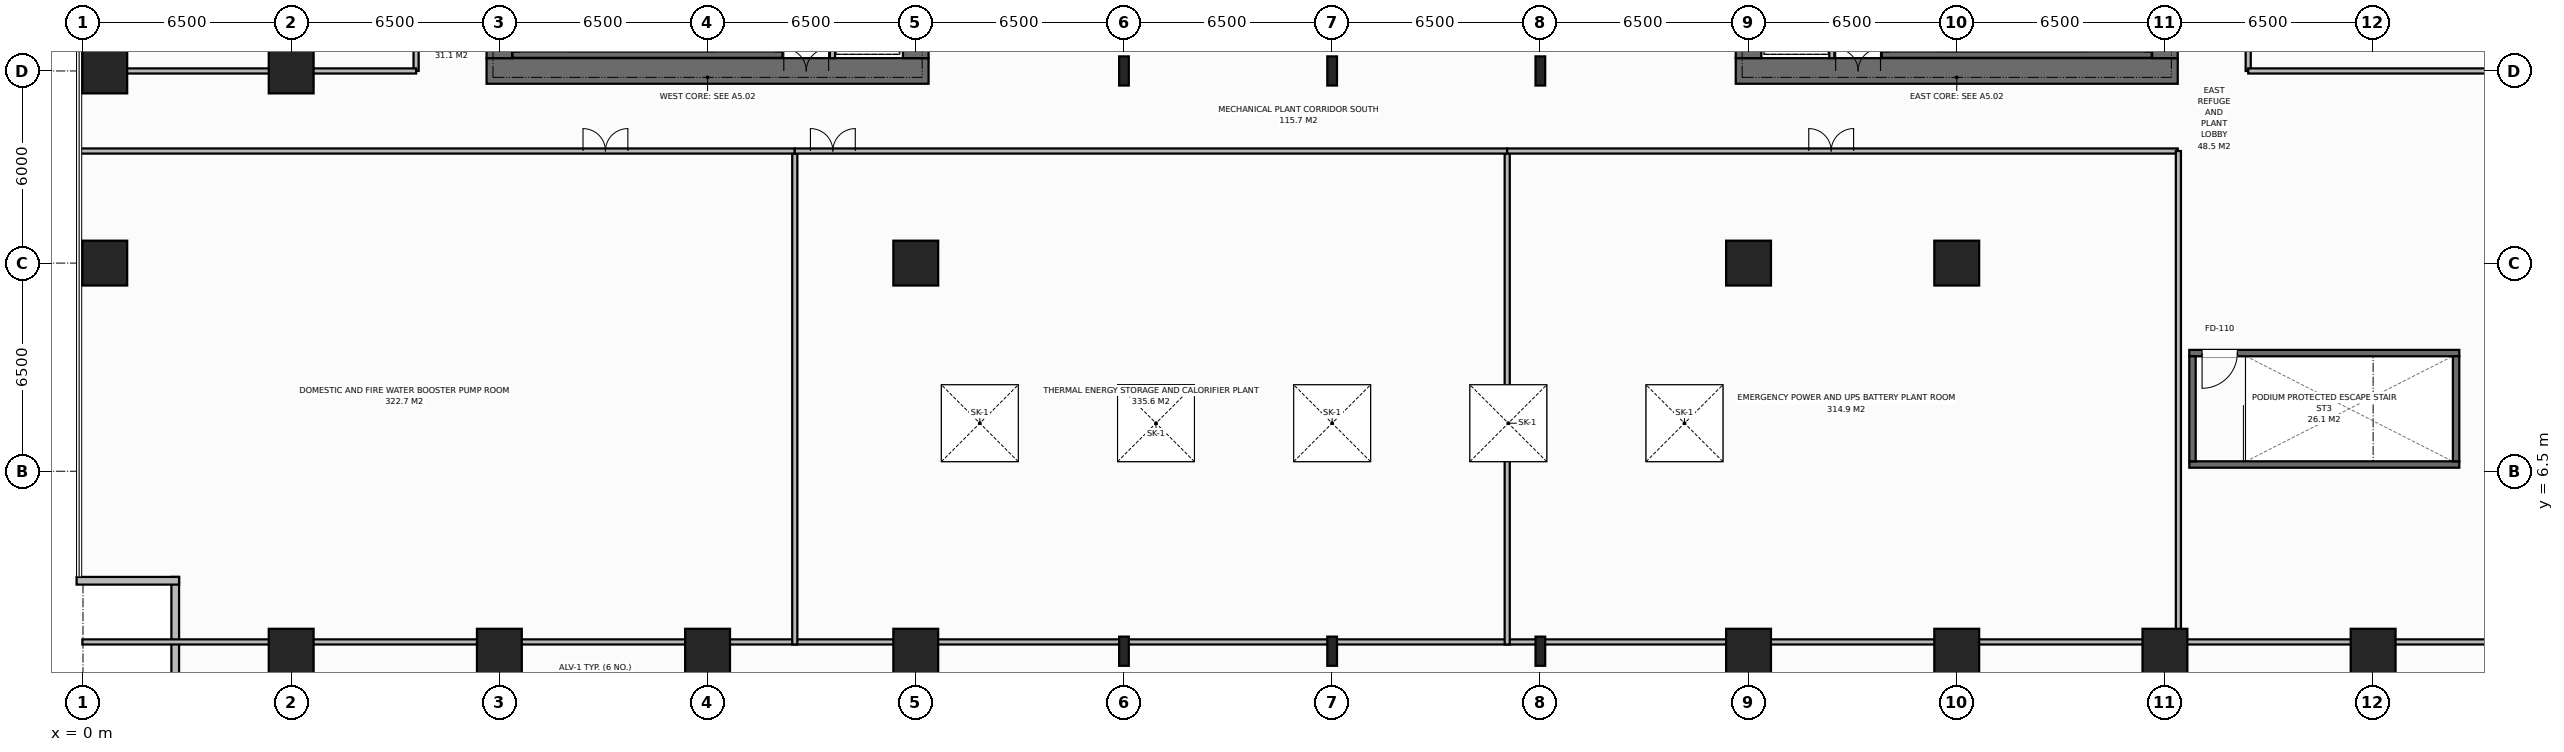
"""IFC4 building model, lengths in metres.
Left out: names, types, materials, properties, quantities, classifications, styles, units other than length and angle.
Written with IfcOpenShell. Run it as: python <this file> out.ifc"""

import sys

from ifc_helpers import new_model, si_unit, direction, frame, frame_2d, origin, origin_2d, place, context, subcontext, project, spatial, rectangle, i_section, extrude, element, fill, save


model = new_model("IFC4")
c1 = context("Model", 3, precision=1e-05, world=origin(), true_north=direction((0.0, 1.0)))
c2 = subcontext(c1, "Body", "Model", "MODEL_VIEW")
j1 = project(units=[si_unit("LENGTHUNIT", "METRE"), si_unit("PLANEANGLEUNIT", "RADIAN")], contexts=[c1])
p1 = place(None, origin())
s1 = spatial("IfcSite", under=j1, at=p1, CompositionType="ELEMENT")
p2 = place(p1, origin())
s2 = spatial("IfcBuilding", under=s1, at=p2, CompositionType="ELEMENT")
p3 = place(p2, frame((0.0, 0.0, 22.0)))
s3 = spatial("IfcBuildingStorey", under=s2, at=p3, CompositionType="ELEMENT", Elevation=22.0)
p4 = place(p3, frame((12.6, 19.0, 0.0), z_axis=(0.0, 0.0, 1.0), x_axis=(1.0, 0.0, 0.0)))
e1 = element("IfcWall", 1, at=p4, inside=s3, PredefinedType="SHEAR", context=c2, shape_type="SweptSolid", body=[
    extrude(rectangle(XDim=13.8, YDim=0.8, at=frame_2d((6.9, 0.0))), origin(), (0.0, 0.0, 1.0), 5.8),
])
p5 = place(p4, frame((9.28, 0.0, 0.0)))
e2 = element("IfcOpeningElement", 2, at=p5, cuts=e1, PredefinedType="OPENING", context=c2, shape_type="SweptSolid", body=[
    extrude(rectangle(XDim=1.4, YDim=2.2, at=frame_2d((0.7, 1.1))), frame((0.0, 0.41, 0.0), z_axis=(0.0, -1.0, 0.0), x_axis=(1.0, 0.0, 0.0)), (0.0, 0.0, 1.0), 0.82),
])
p6 = place(p3, frame((13.0, 19.4, 0.0), z_axis=(0.0, 0.0, 1.0), x_axis=(0.0, 1.0, 0.0)))
e3 = element("IfcWall", 3, at=p6, inside=s3, PredefinedType="SHEAR", context=c2, shape_type="SweptSolid", body=[
    extrude(rectangle(XDim=13.2, YDim=0.8, at=frame_2d((6.6, 0.0))), origin(), (0.0, 0.0, 1.0), 5.8),
])
p7 = place(p6, frame((4.65, 0.0, 0.0)))
e4 = element("IfcOpeningElement", 4, at=p7, cuts=e3, PredefinedType="OPENING", context=c2, shape_type="SweptSolid", body=[
    extrude(rectangle(XDim=1.4, YDim=2.2, at=frame_2d((0.7, 1.1))), frame((0.0, 0.41, 0.0), z_axis=(0.0, -1.0, 0.0), x_axis=(1.0, 0.0, 0.0)), (0.0, 0.0, 1.0), 0.82),
])
p8 = place(p3, frame((26.0, 19.4, 0.0), z_axis=(0.0, 0.0, 1.0), x_axis=(0.0, 1.0, 0.0)))
e5 = element("IfcWall", 5, at=p8, inside=s3, PredefinedType="SHEAR", context=c2, shape_type="SweptSolid", body=[
    extrude(rectangle(XDim=13.2, YDim=0.8, at=frame_2d((6.6, 0.0))), origin(), (0.0, 0.0, 1.0), 5.8),
])
p9 = place(p3, frame((51.6, 19.0, 0.0), z_axis=(0.0, 0.0, 1.0), x_axis=(1.0, 0.0, 0.0)))
e6 = element("IfcWall", 6, at=p9, inside=s3, PredefinedType="SHEAR", context=c2, shape_type="SweptSolid", body=[
    extrude(rectangle(XDim=13.8, YDim=0.8, at=frame_2d((6.9, 0.0))), origin(), (0.0, 0.0, 1.0), 5.8),
])
p10 = place(p9, frame((3.12, 0.0, 0.0)))
e7 = element("IfcOpeningElement", 7, at=p10, cuts=e6, PredefinedType="OPENING", context=c2, shape_type="SweptSolid", body=[
    extrude(rectangle(XDim=1.4, YDim=2.2, at=frame_2d((0.7, 1.1))), frame((0.0, 0.41, 0.0), z_axis=(0.0, -1.0, 0.0), x_axis=(1.0, 0.0, 0.0)), (0.0, 0.0, 1.0), 0.82),
])
p11 = place(p3, frame((52.0, 19.4, 0.0), z_axis=(0.0, 0.0, 1.0), x_axis=(0.0, 1.0, 0.0)))
e8 = element("IfcWall", 8, at=p11, inside=s3, PredefinedType="SHEAR", context=c2, shape_type="SweptSolid", body=[
    extrude(rectangle(XDim=13.2, YDim=0.8, at=frame_2d((6.6, 0.0))), origin(), (0.0, 0.0, 1.0), 5.8),
])
p12 = place(p3, frame((65.0, 19.4, 0.0), z_axis=(0.0, 0.0, 1.0), x_axis=(0.0, 1.0, 0.0)))
e9 = element("IfcWall", 9, at=p12, inside=s3, PredefinedType="SHEAR", context=c2, shape_type="SweptSolid", body=[
    extrude(rectangle(XDim=13.2, YDim=0.8, at=frame_2d((6.6, 0.0))), origin(), (0.0, 0.0, 1.0), 5.8),
])
p13 = place(p12, frame((8.05, 0.0, 0.0)))
e10 = element("IfcOpeningElement", 10, at=p13, cuts=e9, PredefinedType="OPENING", context=c2, shape_type="SweptSolid", body=[
    extrude(rectangle(XDim=1.3, YDim=2.2, at=frame_2d((0.65, 1.1))), frame((0.0, 0.41, 0.0), z_axis=(0.0, -1.0, 0.0), x_axis=(1.0, 0.0, 0.0)), (0.0, 0.0, 1.0), 0.82),
])
for number, where, z_axis, x_axis in (
    (11, (13.41, 19.51, 0.0), (0.0, 0.0, 1.0), (1.0, 0.0, 0.0)),
    (12, (56.16, 19.51, 0.0), (0.0, 0.0, 1.0), (1.0, 0.0, 0.0)),
):
    element("IfcWall", number, at=place(p3, frame(where, z_axis=z_axis, x_axis=x_axis)), inside=s3, PredefinedType="SHEAR", context=c2, shape_type="SweptSolid", body=[
        extrude(rectangle(XDim=8.43, YDim=0.2, at=frame_2d((4.215, 0.0))), origin(), (0.0, 0.0, 1.0), 5.8),
    ])
p14 = place(p3, frame((65.76, 6.71, 0.0), z_axis=(0.0, 0.0, 1.0), x_axis=(1.0, 0.0, 0.0)))
e13 = element("IfcWall", 13, at=p14, inside=s3, PredefinedType="SHEAR", context=c2, shape_type="SweptSolid", body=[
    extrude(rectangle(XDim=8.43, YDim=0.2, at=frame_2d((4.215, 0.0))), origin(), (0.0, 0.0, 1.0), 5.55),
])
p15 = place(p3, frame((65.76, 10.19, 0.0), z_axis=(0.0, 0.0, 1.0), x_axis=(1.0, 0.0, 0.0)))
e14 = element("IfcWall", 14, at=p15, inside=s3, PredefinedType="SHEAR", context=c2, shape_type="SweptSolid", body=[
    extrude(rectangle(XDim=8.43, YDim=0.2, at=frame_2d((4.215, 0.0))), origin(), (0.0, 0.0, 1.0), 5.55),
])
p16 = place(p15, frame((0.4, 0.0, 0.0)))
e15 = element("IfcOpeningElement", 15, at=p16, cuts=e14, PredefinedType="OPENING", context=c2, shape_type="SweptSolid", body=[
    extrude(rectangle(XDim=1.1, YDim=2.15, at=frame_2d((0.55, 1.075))), frame((0.0, 0.11, 0.0), z_axis=(0.0, -1.0, 0.0), x_axis=(1.0, 0.0, 0.0)), (0.0, 0.0, 1.0), 0.22),
])
for number, where, z_axis, x_axis in (
    (16, (65.86, 6.81, 0.0), (0.0, 0.0, 1.0), (0.0, 1.0, 0.0)),
    (17, (74.09, 6.81, 0.0), (0.0, 0.0, 1.0), (0.0, 1.0, 0.0)),
):
    element("IfcWall", number, at=place(p3, frame(where, z_axis=z_axis, x_axis=x_axis)), inside=s3, PredefinedType="SHEAR", context=c2, shape_type="SweptSolid", body=[
        extrude(rectangle(XDim=3.28, YDim=0.2, at=frame_2d((1.64, 0.0))), origin(), (0.0, 0.0, 1.0), 5.55),
    ])
for number, where, z_axis, x_axis in (
    (18, (58.5, 13.0, 0.0), (0.0, 0.0, 1.0), (1.0, 0.0, 0.0)),
    (19, (6.5, 19.0, 0.0), (0.0, 0.0, 1.0), (1.0, 0.0, 0.0)),
    (20, (26.0, 13.0, 0.0), (0.0, 0.0, 1.0), (1.0, 0.0, 0.0)),
    (21, (52.0, 13.0, 0.0), (0.0, 0.0, 1.0), (1.0, 0.0, 0.0)),
    (22, (6.5, 0.88, 0.0), (0.0, 0.0, 1.0), (1.0, 0.0, 0.0)),
    (23, (13.0, 0.88, 0.0), (0.0, 0.0, 1.0), (1.0, 0.0, 0.0)),
    (24, (19.5, 0.88, 0.0), (0.0, 0.0, 1.0), (1.0, 0.0, 0.0)),
    (25, (26.0, 0.88, 0.0), (0.0, 0.0, 1.0), (1.0, 0.0, 0.0)),
    (26, (52.0, 0.88, 0.0), (0.0, 0.0, 1.0), (1.0, 0.0, 0.0)),
    (27, (58.5, 0.88, 0.0), (0.0, 0.0, 1.0), (1.0, 0.0, 0.0)),
    (28, (65.0, 0.88, 0.0), (0.0, 0.0, 1.0), (1.0, 0.0, 0.0)),
    (29, (71.5, 0.88, 0.0), (0.0, 0.0, 1.0), (1.0, 0.0, 0.0)),
    (30, (0.68, 13.0, 0.0), (0.0, 0.0, 1.0), (1.0, 0.0, 0.0)),
    (31, (0.68, 19.0, 0.0), (0.0, 0.0, 1.0), (1.0, 0.0, 0.0)),
):
    element("IfcColumn", number, at=place(p3, frame(where, z_axis=z_axis, x_axis=x_axis)), inside=s3, PredefinedType="COLUMN", context=c2, shape_type="SweptSolid", body=[
        extrude(rectangle(XDim=1.4, YDim=1.4, at=origin_2d()), origin(), (0.0, 0.0, 1.0), 5.8),
    ])
for number, where, z_axis, x_axis in (
    (32, (32.5, 0.88, 0.0), (0.0, 0.0, 1.0), (1.0, 0.0, 0.0)),
    (33, (39.0, 0.88, 0.0), (0.0, 0.0, 1.0), (1.0, 0.0, 0.0)),
    (34, (45.5, 0.88, 0.0), (0.0, 0.0, 1.0), (1.0, 0.0, 0.0)),
    (35, (32.5, 19.0, 0.0), (0.0, 0.0, 1.0), (1.0, 0.0, 0.0)),
    (36, (39.0, 19.0, 0.0), (0.0, 0.0, 1.0), (1.0, 0.0, 0.0)),
    (37, (45.5, 19.0, 0.0), (0.0, 0.0, 1.0), (1.0, 0.0, 0.0)),
):
    element("IfcColumn", number, at=place(p3, frame(where, z_axis=z_axis, x_axis=x_axis)), inside=s3, PredefinedType="COLUMN", context=c2, shape_type="SweptSolid", body=[
        extrude(i_section(OverallWidth=0.302, OverallDepth=0.91, WebThickness=0.021, FlangeThickness=0.04, at=origin_2d()), origin(), (0.0, 0.0, 1.0), 5.8),
    ])
for number, where, z_axis, x_axis in (
    (38, (2.88, 0.0, 0.0), (0.0, 0.0, 1.0), (0.0, 1.0, 0.0)),
    (39, (3.0, 3.08, 0.0), (0.0, 0.0, 1.0), (-1.0, 0.0, 0.0)),
):
    element("IfcWall", number, at=place(p3, frame(where, z_axis=z_axis, x_axis=x_axis)), inside=s3, PredefinedType="STANDARD", context=c2, shape_type="SweptSolid", body=[
        extrude(rectangle(XDim=3.2, YDim=0.24, at=frame_2d((1.6, 0.0))), origin(), (0.0, 0.0, 1.0), 5.55),
    ])
p17 = place(p3, frame((23.4, 19.4, 0.0), z_axis=(0.0, 0.0, 1.0), x_axis=(0.0, 1.0, 0.0)))
e40 = element("IfcWall", 40, at=p17, inside=s3, PredefinedType="STANDARD", context=c2, shape_type="SweptSolid", body=[
    extrude(rectangle(XDim=13.2, YDim=0.16, at=frame_2d((6.6, 0.0))), origin(), (0.0, 0.0, 1.0), 5.55),
])
p18 = place(p17, frame((0.55, 0.0, 0.0)))
e41 = element("IfcOpeningElement", 41, at=p18, cuts=e40, PredefinedType="OPENING", context=c2, shape_type="SweptSolid", body=[
    extrude(rectangle(XDim=1.1, YDim=2.2, at=frame_2d((0.55, 1.1))), frame((0.0, 0.09, 0.0), z_axis=(0.0, -1.0, 0.0), x_axis=(1.0, 0.0, 0.0)), (0.0, 0.0, 1.0), 0.18),
])
p19 = place(p17, frame((2.7, 0.0, 0.0)))
e42 = element("IfcOpeningElement", 42, at=p19, cuts=e40, PredefinedType="OPENING", context=c2, shape_type="SweptSolid", body=[
    extrude(rectangle(XDim=1.1, YDim=2.2, at=frame_2d((0.55, 1.1))), frame((0.0, 0.09, 0.0), z_axis=(0.0, -1.0, 0.0), x_axis=(1.0, 0.0, 0.0)), (0.0, 0.0, 1.0), 0.18),
])
p20 = place(p3, frame((54.6, 19.4, 0.0), z_axis=(0.0, 0.0, 1.0), x_axis=(0.0, 1.0, 0.0)))
e43 = element("IfcWall", 43, at=p20, inside=s3, PredefinedType="STANDARD", context=c2, shape_type="SweptSolid", body=[
    extrude(rectangle(XDim=13.2, YDim=0.16, at=frame_2d((6.6, 0.0))), origin(), (0.0, 0.0, 1.0), 5.55),
])
p21 = place(p20, frame((0.55, 0.0, 0.0)))
e44 = element("IfcOpeningElement", 44, at=p21, cuts=e43, PredefinedType="OPENING", context=c2, shape_type="SweptSolid", body=[
    extrude(rectangle(XDim=1.1, YDim=2.2, at=frame_2d((0.55, 1.1))), frame((0.0, 0.09, 0.0), z_axis=(0.0, -1.0, 0.0), x_axis=(1.0, 0.0, 0.0)), (0.0, 0.0, 1.0), 0.18),
])
p22 = place(p20, frame((2.7, 0.0, 0.0)))
e45 = element("IfcOpeningElement", 45, at=p22, cuts=e43, PredefinedType="OPENING", context=c2, shape_type="SweptSolid", body=[
    extrude(rectangle(XDim=1.1, YDim=2.2, at=frame_2d((0.55, 1.1))), frame((0.0, 0.09, 0.0), z_axis=(0.0, -1.0, 0.0), x_axis=(1.0, 0.0, 0.0)), (0.0, 0.0, 1.0), 0.18),
])
p23 = place(p3, frame((-0.02, 1.17, 0.0), z_axis=(0.0, 0.0, 1.0), x_axis=(1.0, 0.0, 0.0)))
e46 = element("IfcWall", 46, at=p23, inside=s3, PredefinedType="STANDARD", context=c2, shape_type="SweptSolid", body=[
    extrude(rectangle(XDim=78.04, YDim=0.16, at=frame_2d((39.02, 0.0))), origin(), (0.0, 0.0, 1.0), 3.15),
])
p24 = place(p3, frame((10.4, 19.0, 0.0), z_axis=(0.0, 0.0, 1.0), x_axis=(0.0, 1.0, 0.0)))
e47 = element("IfcWall", 47, at=p24, inside=s3, PredefinedType="STANDARD", context=c2, shape_type="SweptSolid", body=[
    extrude(rectangle(XDim=14.0, YDim=0.16, at=frame_2d((7.0, 0.0))), origin(), (0.0, 0.0, 1.0), 5.55),
])
p25 = place(p24, frame((5.2, 0.0, 0.0)))
e48 = element("IfcOpeningElement", 48, at=p25, cuts=e47, PredefinedType="OPENING", context=c2, shape_type="SweptSolid", body=[
    extrude(rectangle(XDim=1.4, YDim=2.2, at=frame_2d((0.7, 1.1))), frame((0.0, 0.09, 0.0), z_axis=(0.0, -1.0, 0.0), x_axis=(1.0, 0.0, 0.0)), (0.0, 0.0, 1.0), 0.18),
])
p26 = place(p3, frame((-0.18, 19.0, 0.0), z_axis=(0.0, 0.0, 1.0), x_axis=(1.0, 0.0, 0.0)))
e49 = element("IfcWall", 49, at=p26, inside=s3, PredefinedType="STANDARD", context=c2, shape_type="SweptSolid", body=[
    extrude(rectangle(XDim=10.58, YDim=0.16, at=frame_2d((5.29, 0.0))), origin(), (0.0, 0.0, 1.0), 4.9),
])
p27 = place(p3, frame((67.6, 19.0, 0.0), z_axis=(0.0, 0.0, 1.0), x_axis=(0.0, 1.0, 0.0)))
e50 = element("IfcWall", 50, at=p27, inside=s3, PredefinedType="STANDARD", context=c2, shape_type="SweptSolid", body=[
    extrude(rectangle(XDim=14.0, YDim=0.16, at=frame_2d((7.0, 0.0))), origin(), (0.0, 0.0, 1.0), 5.55),
])
p28 = place(p27, frame((5.2, 0.0, 0.0)))
e51 = element("IfcOpeningElement", 51, at=p28, cuts=e50, PredefinedType="OPENING", context=c2, shape_type="SweptSolid", body=[
    extrude(rectangle(XDim=1.4, YDim=2.2, at=frame_2d((0.7, 1.1))), frame((0.0, 0.09, 0.0), z_axis=(0.0, -1.0, 0.0), x_axis=(1.0, 0.0, 0.0)), (0.0, 0.0, 1.0), 0.18),
])
p29 = place(p3, frame((67.6, 19.0, 0.0), z_axis=(0.0, 0.0, 1.0), x_axis=(1.0, 0.0, 0.0)))
e52 = element("IfcWall", 52, at=p29, inside=s3, PredefinedType="STANDARD", context=c2, shape_type="SweptSolid", body=[
    extrude(rectangle(XDim=10.58, YDim=0.16, at=frame_2d((5.29, 0.0))), origin(), (0.0, 0.0, 1.0), 4.9),
])
p30 = place(p3, frame((22.223, 1.09, 0.0), z_axis=(0.0, 0.0, 1.0), x_axis=(0.0, 1.0, 0.0)))
e53 = element("IfcWall", 53, at=p30, inside=s3, PredefinedType="STANDARD", context=c2, shape_type="SweptSolid", body=[
    extrude(rectangle(XDim=15.41, YDim=0.16, at=frame_2d((7.705, 0.0))), origin(), (0.0, 0.0, 1.0), 5.55),
])
p31 = place(p3, frame((-0.18, 16.5, 0.0), z_axis=(0.0, 0.0, 1.0), x_axis=(1.0, 0.0, 0.0)))
e54 = element("IfcWall", 54, at=p31, inside=s3, PredefinedType="STANDARD", context=c2, shape_type="SweptSolid", body=[
    extrude(rectangle(XDim=22.403, YDim=0.16, at=frame_2d((11.201, 0.0))), origin(), (0.0, 0.0, 1.0), 5.55),
])
p32 = place(p31, frame((15.792, 0.0, 0.0)))
e55 = element("IfcOpeningElement", 55, at=p32, cuts=e54, PredefinedType="OPENING", context=c2, shape_type="SweptSolid", body=[
    extrude(rectangle(XDim=1.4, YDim=2.2, at=frame_2d((0.7, 1.1))), frame((0.0, 0.09, 0.0), z_axis=(0.0, -1.0, 0.0), x_axis=(1.0, 0.0, 0.0)), (0.0, 0.0, 1.0), 0.18),
])
p33 = place(p3, frame((44.466, 1.09, 0.0), z_axis=(0.0, 0.0, 1.0), x_axis=(0.0, 1.0, 0.0)))
e56 = element("IfcWall", 56, at=p33, inside=s3, PredefinedType="STANDARD", context=c2, shape_type="SweptSolid", body=[
    extrude(rectangle(XDim=15.41, YDim=0.16, at=frame_2d((7.705, 0.0))), origin(), (0.0, 0.0, 1.0), 5.55),
])
p34 = place(p3, frame((22.223, 16.5, 0.0), z_axis=(0.0, 0.0, 1.0), x_axis=(1.0, 0.0, 0.0)))
e57 = element("IfcWall", 57, at=p34, inside=s3, PredefinedType="STANDARD", context=c2, shape_type="SweptSolid", body=[
    extrude(rectangle(XDim=22.243, YDim=0.16, at=frame_2d((11.121, 0.0))), origin(), (0.0, 0.0, 1.0), 5.55),
])
p35 = place(p34, frame((0.489, 0.0, 0.0)))
e58 = element("IfcOpeningElement", 58, at=p35, cuts=e57, PredefinedType="OPENING", context=c2, shape_type="SweptSolid", body=[
    extrude(rectangle(XDim=1.4, YDim=2.2, at=frame_2d((0.7, 1.1))), frame((0.0, 0.09, 0.0), z_axis=(0.0, -1.0, 0.0), x_axis=(1.0, 0.0, 0.0)), (0.0, 0.0, 1.0), 0.18),
])
p36 = place(p3, frame((44.466, 16.5, 0.0), z_axis=(0.0, 0.0, 1.0), x_axis=(1.0, 0.0, 0.0)))
e59 = element("IfcWall", 59, at=p36, inside=s3, PredefinedType="STANDARD", context=c2, shape_type="SweptSolid", body=[
    extrude(rectangle(XDim=20.934, YDim=0.16, at=frame_2d((10.467, 0.0))), origin(), (0.0, 0.0, 1.0), 5.55),
])
p37 = place(p36, frame((9.414, 0.0, 0.0)))
e60 = element("IfcOpeningElement", 60, at=p37, cuts=e59, PredefinedType="OPENING", context=c2, shape_type="SweptSolid", body=[
    extrude(rectangle(XDim=1.4, YDim=2.2, at=frame_2d((0.7, 1.1))), frame((0.0, 0.09, 0.0), z_axis=(0.0, -1.0, 0.0), x_axis=(1.0, 0.0, 0.0)), (0.0, 0.0, 1.0), 0.18),
])
p38 = place(p3, frame((65.42, 1.09, 0.0), z_axis=(0.0, 0.0, 1.0), x_axis=(0.0, 1.0, 0.0)))
e61 = element("IfcWall", 61, at=p38, inside=s3, PredefinedType="STANDARD", context=c2, shape_type="SweptSolid", body=[
    extrude(rectangle(XDim=15.41, YDim=0.16, at=frame_2d((7.705, 0.0))), origin(), (0.0, 0.0, 1.0), 5.55),
])
p39 = place(p3, frame((0.0, 0.0, -0.6)))
p40 = place(p39, frame((28.0, 8.0, 0.0)))
p41 = place(p40, frame((0.0, 0.0, 0.55)))
e62 = element("IfcWindow", 62, at=p41, inside=s3, PartitioningType="SINGLE_PANEL", PredefinedType="SKYLIGHT", context=c2, shape_type="SweptSolid", body=[
    extrude(rectangle(XDim=2.4, YDim=2.4, at=origin_2d()), origin(), (0.0, 0.0, 1.0), 0.05),
])
p42 = place(p39, frame((33.5, 8.0, 0.0)))
p43 = place(p42, frame((0.0, 0.0, 0.55)))
e63 = element("IfcWindow", 63, at=p43, inside=s3, PartitioningType="SINGLE_PANEL", PredefinedType="SKYLIGHT", context=c2, shape_type="SweptSolid", body=[
    extrude(rectangle(XDim=2.4, YDim=2.4, at=origin_2d()), origin(), (0.0, 0.0, 1.0), 0.05),
])
p44 = place(p39, frame((39.0, 8.0, 0.0)))
p45 = place(p44, frame((0.0, 0.0, 0.55)))
e64 = element("IfcWindow", 64, at=p45, inside=s3, PartitioningType="SINGLE_PANEL", PredefinedType="SKYLIGHT", context=c2, shape_type="SweptSolid", body=[
    extrude(rectangle(XDim=2.4, YDim=2.4, at=origin_2d()), origin(), (0.0, 0.0, 1.0), 0.05),
])
p46 = place(p39, frame((44.5, 8.0, 0.0)))
p47 = place(p46, frame((0.0, 0.0, 0.55)))
e65 = element("IfcWindow", 65, at=p47, inside=s3, PartitioningType="SINGLE_PANEL", PredefinedType="SKYLIGHT", context=c2, shape_type="SweptSolid", body=[
    extrude(rectangle(XDim=2.4, YDim=2.4, at=origin_2d()), origin(), (0.0, 0.0, 1.0), 0.05),
])
p48 = place(p39, frame((50.0, 8.0, 0.0)))
p49 = place(p48, frame((0.0, 0.0, 0.55)))
e66 = element("IfcWindow", 66, at=p49, inside=s3, PartitioningType="SINGLE_PANEL", PredefinedType="SKYLIGHT", context=c2, shape_type="SweptSolid", body=[
    extrude(rectangle(XDim=2.4, YDim=2.4, at=origin_2d()), origin(), (0.0, 0.0, 1.0), 0.05),
])
p50 = place(p5, origin())
e67 = element("IfcDoor", 67, at=p50, inside=s3, OperationType="DOUBLE_DOOR_SINGLE_SWING", PredefinedType="DOOR", context=c2, shape_type="SweptSolid", body=[
    extrude(rectangle(XDim=1.4, YDim=2.2, at=frame_2d((0.7, 1.1))), frame((0.0, 0.125, 0.0), z_axis=(0.0, -1.0, 0.0), x_axis=(1.0, 0.0, 0.0)), (0.0, 0.0, 1.0), 0.05),
])
fill(e2, e67)
p51 = place(p10, origin())
e68 = element("IfcDoor", 68, at=p51, inside=s3, OperationType="DOUBLE_DOOR_SINGLE_SWING", PredefinedType="DOOR", context=c2, shape_type="SweptSolid", body=[
    extrude(rectangle(XDim=1.4, YDim=2.2, at=frame_2d((0.7, 1.1))), frame((0.0, 0.125, 0.0), z_axis=(0.0, -1.0, 0.0), x_axis=(1.0, 0.0, 0.0)), (0.0, 0.0, 1.0), 0.05),
])
fill(e7, e68)
p52 = place(p16, origin())
e69 = element("IfcDoor", 69, at=p52, inside=s3, OperationType="SINGLE_SWING_RIGHT", PredefinedType="DOOR", context=c2, shape_type="SweptSolid", body=[
    extrude(rectangle(XDim=1.1, YDim=2.15, at=frame_2d((0.55, 1.075))), frame((0.0, 0.025, 0.0), z_axis=(0.0, -1.0, 0.0), x_axis=(1.0, 0.0, 0.0)), (0.0, 0.0, 1.0), 0.05),
])
fill(e15, e69)
p53 = place(p32, origin())
e70 = element("IfcDoor", 70, at=p53, inside=s3, OperationType="DOUBLE_DOOR_SINGLE_SWING", PredefinedType="DOOR", context=c2, shape_type="SweptSolid", body=[
    extrude(rectangle(XDim=1.4, YDim=2.2, at=frame_2d((0.7, 1.1))), frame((0.0, 0.025, 0.0), z_axis=(0.0, -1.0, 0.0), x_axis=(1.0, 0.0, 0.0)), (0.0, 0.0, 1.0), 0.05),
])
fill(e55, e70)
p54 = place(p35, origin())
e71 = element("IfcDoor", 71, at=p54, inside=s3, OperationType="DOUBLE_DOOR_SINGLE_SWING", PredefinedType="DOOR", context=c2, shape_type="SweptSolid", body=[
    extrude(rectangle(XDim=1.4, YDim=2.2, at=frame_2d((0.7, 1.1))), frame((0.0, 0.025, 0.0), z_axis=(0.0, -1.0, 0.0), x_axis=(1.0, 0.0, 0.0)), (0.0, 0.0, 1.0), 0.05),
])
fill(e58, e71)
p55 = place(p37, origin())
e72 = element("IfcDoor", 72, at=p55, inside=s3, OperationType="DOUBLE_DOOR_SINGLE_SWING", PredefinedType="DOOR", context=c2, shape_type="SweptSolid", body=[
    extrude(rectangle(XDim=1.4, YDim=2.2, at=frame_2d((0.7, 1.1))), frame((0.0, 0.025, 0.0), z_axis=(0.0, -1.0, 0.0), x_axis=(1.0, 0.0, 0.0)), (0.0, 0.0, 1.0), 0.05),
])
fill(e60, e72)
save(model, sys.argv[1])
